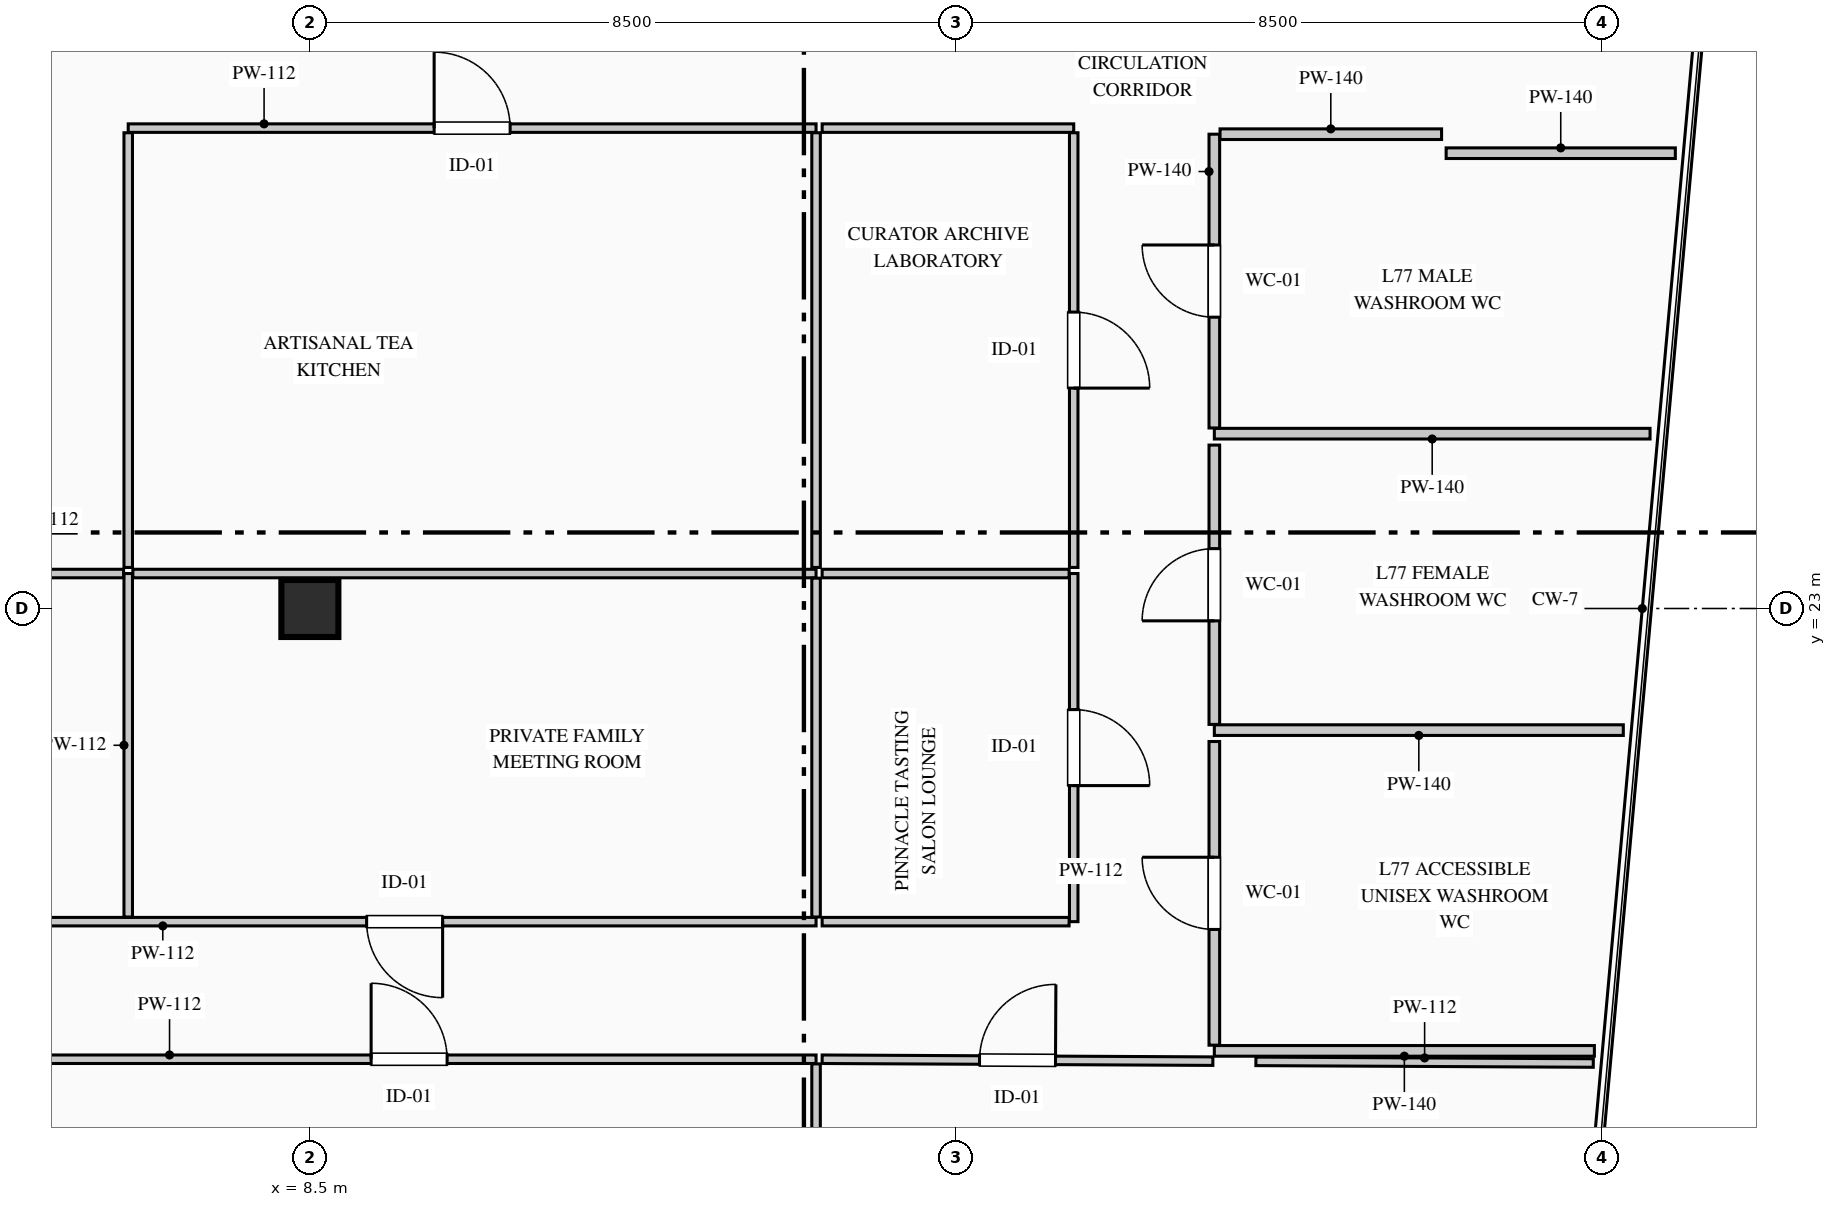
"""IFC4 building model, lengths in metres.
Left out: names, types, materials, properties, quantities, classifications, styles, units other than length and angle.
Written with IfcOpenShell. Run it as: python <this file> out.ifc"""

import sys

from ifc_helpers import new_model, si_unit, direction, frame, frame_2d, origin, origin_2d, place, context, subcontext, project, spatial, rectangle, extrude, element, fill, save


model = new_model("IFC4")
c1 = context("Model", 3, precision=1e-05, world=origin(), true_north=direction((0.0, 1.0)))
c2 = subcontext(c1, "Body", "Model", "MODEL_VIEW")
j1 = project(units=[si_unit("LENGTHUNIT", "METRE"), si_unit("PLANEANGLEUNIT", "RADIAN")], contexts=[c1])
p1 = place(None, origin())
s1 = spatial("IfcSite", under=j1, at=p1, CompositionType="ELEMENT")
p2 = place(p1, origin())
s2 = spatial("IfcBuilding", under=s1, at=p2, CompositionType="ELEMENT")
p3 = place(p2, frame((0.0, 0.0, 319.9)))
s3 = spatial("IfcBuildingStorey", under=s2, at=p3, CompositionType="ELEMENT", Elevation=319.9)
p4 = place(p3, frame((8.5, 23.0, 0.0), z_axis=(0.0, 0.0, 1.0), x_axis=(1.0, 0.0, 0.0)))
e1 = element("IfcColumn", 1, at=p4, inside=s3, PredefinedType="COLUMN", context=c2, shape_type="SweptSolid", body=[
    extrude(rectangle(XDim=0.75, YDim=0.75, at=origin_2d()), origin(), (0.0, 0.0, 1.0), 4.15),
])
p5 = place(p3, frame((23.45, 28.99, 0.0), z_axis=(0.0, 0.0, 1.0), x_axis=(1.0, 0.0, 0.0)))
e2 = element("IfcWall", 2, at=p5, inside=s3, PredefinedType="PARTITIONING", context=c2, shape_type="SweptSolid", body=[
    extrude(rectangle(XDim=3.016, YDim=0.14, at=frame_2d((1.508, 0.0))), origin(), (0.0, 0.0, 1.0), 3.83),
])
p6 = place(p3, frame((26.133, 25.3, 0.0), z_axis=(0.0, 0.0, 1.0), x_axis=(-1.0, 0.0, 0.0)))
e3 = element("IfcWall", 3, at=p6, inside=s3, PredefinedType="PARTITIONING", context=c2, shape_type="SweptSolid", body=[
    extrude(rectangle(XDim=5.733, YDim=0.14, at=frame_2d((2.866, 0.0))), origin(), (0.0, 0.0, 1.0), 3.83),
])
p7 = place(p3, frame((20.4, 25.375, 0.0), z_axis=(0.0, 0.0, 1.0), x_axis=(0.0, 1.0, 0.0)))
e4 = element("IfcWall", 4, at=p7, inside=s3, PredefinedType="PARTITIONING", context=c2, shape_type="SweptSolid", body=[
    extrude(rectangle(XDim=3.865, YDim=0.14, at=frame_2d((1.933, 0.0))), origin(), (0.0, 0.0, 1.0), 3.83),
])
p8 = place(p7, frame((1.458, 0.0, 0.0)))
e5 = element("IfcOpeningElement", 5, at=p8, cuts=e4, PredefinedType="OPENING", context=c2, shape_type="SweptSolid", body=[
    extrude(rectangle(XDim=0.95, YDim=2.15, at=frame_2d((0.475, 1.075))), frame((0.0, 0.08, 0.0), z_axis=(0.0, -1.0, 0.0), x_axis=(1.0, 0.0, 0.0)), (0.0, 0.0, 1.0), 0.16),
])
p9 = place(p3, frame((20.475, 29.24, 0.0), z_axis=(0.0, 0.0, 1.0), x_axis=(1.0, 0.0, 0.0)))
e6 = element("IfcWall", 6, at=p9, inside=s3, PredefinedType="PARTITIONING", context=c2, shape_type="SweptSolid", body=[
    extrude(rectangle(XDim=2.915, YDim=0.14, at=frame_2d((1.458, 0.0))), origin(), (0.0, 0.0, 1.0), 3.83),
])
p10 = place(p3, frame((25.781, 21.4, 0.0), z_axis=(0.0, 0.0, 1.0), x_axis=(-1.0, 0.0, 0.0)))
e7 = element("IfcWall", 7, at=p10, inside=s3, PredefinedType="PARTITIONING", context=c2, shape_type="SweptSolid", body=[
    extrude(rectangle(XDim=5.381, YDim=0.14, at=frame_2d((2.69, 0.0))), origin(), (0.0, 0.0, 1.0), 3.83),
])
p11 = place(p3, frame((20.4, 21.475, 0.0), z_axis=(0.0, 0.0, 1.0), x_axis=(0.0, 1.0, 0.0)))
e8 = element("IfcWall", 8, at=p11, inside=s3, PredefinedType="PARTITIONING", context=c2, shape_type="SweptSolid", body=[
    extrude(rectangle(XDim=3.675, YDim=0.14, at=frame_2d((1.837, 0.0))), origin(), (0.0, 0.0, 1.0), 3.83),
])
p12 = place(p11, frame((1.363, 0.0, 0.0)))
e9 = element("IfcOpeningElement", 9, at=p12, cuts=e8, PredefinedType="OPENING", context=c2, shape_type="SweptSolid", body=[
    extrude(rectangle(XDim=0.95, YDim=2.15, at=frame_2d((0.475, 1.075))), frame((0.0, 0.08, 0.0), z_axis=(0.0, -1.0, 0.0), x_axis=(1.0, 0.0, 0.0)), (0.0, 0.0, 1.0), 0.16),
])
p13 = place(p3, frame((25.4, 17.18, 0.0), z_axis=(0.0, 0.0, 1.0), x_axis=(-1.0, 0.0, 0.0)))
e10 = element("IfcWall", 10, at=p13, inside=s3, PredefinedType="PARTITIONING", context=c2, shape_type="SweptSolid", body=[
    extrude(rectangle(XDim=5.0, YDim=0.14, at=frame_2d((2.5, 0.0))), origin(), (0.0, 0.0, 1.0), 3.83),
])
p14 = place(p3, frame((20.4, 17.255, 0.0), z_axis=(0.0, 0.0, 1.0), x_axis=(0.0, 1.0, 0.0)))
e11 = element("IfcWall", 11, at=p14, inside=s3, PredefinedType="PARTITIONING", context=c2, shape_type="SweptSolid", body=[
    extrude(rectangle(XDim=3.995, YDim=0.14, at=frame_2d((1.998, 0.0))), origin(), (0.0, 0.0, 1.0), 3.83),
])
p15 = place(p14, frame((1.522, 0.0, 0.0)))
e12 = element("IfcOpeningElement", 12, at=p15, cuts=e11, PredefinedType="OPENING", context=c2, shape_type="SweptSolid", body=[
    extrude(rectangle(XDim=0.95, YDim=2.15, at=frame_2d((0.475, 1.075))), frame((0.0, 0.08, 0.0), z_axis=(0.0, -1.0, 0.0), x_axis=(1.0, 0.0, 0.0)), (0.0, 0.0, 1.0), 0.16),
])
p16 = place(p3, frame((4.451, 17.07, 0.0), z_axis=(0.0, 0.0, 1.0), x_axis=(1.0, 0.0, 0.0)))
e13 = element("IfcWall", 13, at=p16, inside=s3, PredefinedType="PARTITIONING", context=c2, shape_type="SweptSolid", body=[
    extrude(rectangle(XDim=10.708, YDim=0.112, at=frame_2d((5.354, 0.0))), origin(), (0.0, 0.0, 1.0), 3.83),
])
p17 = place(p16, frame((4.854, 0.0, 0.0)))
e14 = element("IfcOpeningElement", 14, at=p17, cuts=e13, PredefinedType="OPENING", context=c2, shape_type="SweptSolid", body=[
    extrude(rectangle(XDim=1.0, YDim=2.15, at=frame_2d((0.5, 1.075))), frame((0.0, 0.066, 0.0), z_axis=(0.0, -1.0, 0.0), x_axis=(1.0, 0.0, 0.0)), (0.0, 0.0, 1.0), 0.132),
])
p18 = place(p3, frame((15.16, 17.009, 0.0), z_axis=(0.0, 0.0, 1.0), x_axis=(0.0, -1.0, 0.0)))
e15 = element("IfcWall", 15, at=p18, inside=s3, PredefinedType="PARTITIONING", context=c2, shape_type="SweptSolid", body=[
    extrude(rectangle(XDim=6.884, YDim=0.112, at=frame_2d((3.442, 0.0))), origin(), (0.0, 0.0, 1.0), 3.83),
])
p19 = place(p3, frame((20.947, 17.042, 0.0), z_axis=(0.0, 0.0, 1.0), x_axis=(0.999988019942, -0.004894892409, 0.0)))
e16 = element("IfcWall", 16, at=p19, inside=s3, PredefinedType="PARTITIONING", context=c2, shape_type="SweptSolid", body=[
    extrude(rectangle(XDim=4.439, YDim=0.112, at=frame_2d((2.219, 0.0))), origin(), (0.0, 0.0, 1.0), 3.83),
])
p20 = place(p3, frame((15.24, 17.07, 0.0), z_axis=(0.0, 0.0, 1.0), x_axis=(0.999988036902, -0.0048914265, 0.0)))
e17 = element("IfcWall", 17, at=p20, inside=s3, PredefinedType="PARTITIONING", context=c2, shape_type="SweptSolid", body=[
    extrude(rectangle(XDim=5.141, YDim=0.112, at=frame_2d((2.57, 0.0))), origin(), (0.0, 0.0, 1.0), 3.83),
])
p21 = place(p20, frame((2.071, 0.0, 0.0)))
e18 = element("IfcOpeningElement", 18, at=p21, cuts=e17, PredefinedType="OPENING", context=c2, shape_type="SweptSolid", body=[
    extrude(rectangle(XDim=1.0, YDim=2.15, at=frame_2d((0.5, 1.075))), frame((0.0, 0.066, 0.0), z_axis=(0.0, -1.0, 0.0), x_axis=(1.0, 0.0, 0.0)), (0.0, 0.0, 1.0), 0.132),
])
p22 = place(p3, frame((15.16, 18.88, 0.0), z_axis=(0.0, 0.0, 1.0), x_axis=(-1.0, 0.0, 0.0)))
e19 = element("IfcWall", 19, at=p22, inside=s3, PredefinedType="PARTITIONING", context=c2, shape_type="SweptSolid", body=[
    extrude(rectangle(XDim=10.827, YDim=0.112, at=frame_2d((5.413, 0.0))), origin(), (0.0, 0.0, 1.0), 3.83),
])
p23 = place(p22, frame((4.913, 0.0, 0.0)))
e20 = element("IfcOpeningElement", 20, at=p23, cuts=e19, PredefinedType="OPENING", context=c2, shape_type="SweptSolid", body=[
    extrude(rectangle(XDim=1.0, YDim=2.15, at=frame_2d((0.5, 1.075))), frame((0.0, 0.066, 0.0), z_axis=(0.0, -1.0, 0.0), x_axis=(1.0, 0.0, 0.0)), (0.0, 0.0, 1.0), 0.132),
])
p24 = place(p3, frame((6.11, 18.941, 0.0), z_axis=(0.0, 0.0, 1.0), x_axis=(0.0, 1.0, 0.0)))
e21 = element("IfcWall", 21, at=p24, inside=s3, PredefinedType="PARTITIONING", context=c2, shape_type="SweptSolid", body=[
    extrude(rectangle(XDim=4.519, YDim=0.112, at=frame_2d((2.26, 0.0))), origin(), (0.0, 0.0, 1.0), 3.83),
])
p25 = place(p3, frame((4.034, 23.46, 0.0), z_axis=(0.0, 0.0, 1.0), x_axis=(1.0, 0.0, 0.0)))
e22 = element("IfcWall", 22, at=p25, inside=s3, PredefinedType="PARTITIONING", context=c2, shape_type="SweptSolid", body=[
    extrude(rectangle(XDim=2.015, YDim=0.112, at=frame_2d((1.007, 0.0))), origin(), (0.0, 0.0, 1.0), 3.83),
])
p26 = place(p3, frame((6.171, 23.46, 0.0), z_axis=(0.0, 0.0, 1.0), x_axis=(1.0, 0.0, 0.0)))
e23 = element("IfcWall", 23, at=p26, inside=s3, PredefinedType="PARTITIONING", context=c2, shape_type="SweptSolid", body=[
    extrude(rectangle(XDim=8.989, YDim=0.112, at=frame_2d((4.495, 0.0))), origin(), (0.0, 0.0, 1.0), 3.83),
])
p27 = place(p3, frame((15.16, 23.399, 0.0), z_axis=(0.0, 0.0, 1.0), x_axis=(0.0, -1.0, 0.0)))
e24 = element("IfcWall", 24, at=p27, inside=s3, PredefinedType="PARTITIONING", context=c2, shape_type="SweptSolid", body=[
    extrude(rectangle(XDim=4.458, YDim=0.112, at=frame_2d((2.229, 0.0))), origin(), (0.0, 0.0, 1.0), 3.83),
])
p28 = place(p3, frame((18.55, 23.46, 0.0), z_axis=(0.0, 0.0, 1.0), x_axis=(0.0, -1.0, 0.0)))
e25 = element("IfcWall", 25, at=p28, inside=s3, PredefinedType="PARTITIONING", context=c2, shape_type="SweptSolid", body=[
    extrude(rectangle(XDim=4.58, YDim=0.112, at=frame_2d((2.29, 0.0))), origin(), (0.0, 0.0, 1.0), 3.83),
])
p29 = place(p28, frame((1.79, 0.0, 0.0)))
e26 = element("IfcOpeningElement", 26, at=p29, cuts=e25, PredefinedType="OPENING", context=c2, shape_type="SweptSolid", body=[
    extrude(rectangle(XDim=1.0, YDim=2.15, at=frame_2d((0.5, 1.075))), frame((0.0, 0.066, 0.0), z_axis=(0.0, -1.0, 0.0), x_axis=(1.0, 0.0, 0.0)), (0.0, 0.0, 1.0), 0.132),
])
for number, where, z_axis, x_axis in (
    (27, (18.489, 18.88, 0.0), (0.0, 0.0, 1.0), (-1.0, 0.0, 0.0)),
    (28, (15.24, 23.46, 0.0), (0.0, 0.0, 1.0), (1.0, 0.0, 0.0)),
):
    element("IfcWall", number, at=place(p3, frame(where, z_axis=z_axis, x_axis=x_axis)), inside=s3, PredefinedType="PARTITIONING", context=c2, shape_type="SweptSolid", body=[
        extrude(rectangle(XDim=3.249, YDim=0.112, at=frame_2d((1.625, 0.0))), origin(), (0.0, 0.0, 1.0), 3.83),
    ])
p30 = place(p3, frame((6.11, 29.32, 0.0), z_axis=(0.0, 0.0, 1.0), x_axis=(1.0, 0.0, 0.0)))
e29 = element("IfcWall", 29, at=p30, inside=s3, PredefinedType="PARTITIONING", context=c2, shape_type="SweptSolid", body=[
    extrude(rectangle(XDim=9.05, YDim=0.112, at=frame_2d((4.525, 0.0))), origin(), (0.0, 0.0, 1.0), 3.83),
])
p31 = place(p30, frame((4.025, 0.0, 0.0)))
e30 = element("IfcOpeningElement", 30, at=p31, cuts=e29, PredefinedType="OPENING", context=c2, shape_type="SweptSolid", body=[
    extrude(rectangle(XDim=1.0, YDim=2.15, at=frame_2d((0.5, 1.075))), frame((0.0, 0.066, 0.0), z_axis=(0.0, -1.0, 0.0), x_axis=(1.0, 0.0, 0.0)), (0.0, 0.0, 1.0), 0.132),
])
for number, where, z_axis, x_axis in (
    (31, (15.16, 29.259, 0.0), (0.0, 0.0, 1.0), (0.0, -1.0, 0.0)),
    (32, (6.11, 23.54, 0.0), (0.0, 0.0, 1.0), (0.0, 1.0, 0.0)),
):
    element("IfcWall", number, at=place(p3, frame(where, z_axis=z_axis, x_axis=x_axis)), inside=s3, PredefinedType="PARTITIONING", context=c2, shape_type="SweptSolid", body=[
        extrude(rectangle(XDim=5.719, YDim=0.112, at=frame_2d((2.859, 0.0))), origin(), (0.0, 0.0, 1.0), 3.83),
    ])
p32 = place(p3, frame((15.24, 29.32, 0.0), z_axis=(0.0, 0.0, 1.0), x_axis=(1.0, 0.0, 0.0)))
e33 = element("IfcWall", 33, at=p32, inside=s3, PredefinedType="PARTITIONING", context=c2, shape_type="SweptSolid", body=[
    extrude(rectangle(XDim=3.31, YDim=0.112, at=frame_2d((1.655, 0.0))), origin(), (0.0, 0.0, 1.0), 3.83),
])
p33 = place(p3, frame((18.55, 29.259, 0.0), z_axis=(0.0, 0.0, 1.0), x_axis=(0.0, -1.0, 0.0)))
e34 = element("IfcWall", 34, at=p33, inside=s3, PredefinedType="PARTITIONING", context=c2, shape_type="SweptSolid", body=[
    extrude(rectangle(XDim=5.719, YDim=0.112, at=frame_2d((2.859, 0.0))), origin(), (0.0, 0.0, 1.0), 3.83),
])
p34 = place(p33, frame((2.36, 0.0, 0.0)))
e35 = element("IfcOpeningElement", 35, at=p34, cuts=e34, PredefinedType="OPENING", context=c2, shape_type="SweptSolid", body=[
    extrude(rectangle(XDim=1.0, YDim=2.15, at=frame_2d((0.5, 1.075))), frame((0.0, 0.066, 0.0), z_axis=(0.0, -1.0, 0.0), x_axis=(1.0, 0.0, 0.0)), (0.0, 0.0, 1.0), 0.132),
])
p35 = place(p8, origin())
e36 = element("IfcDoor", 36, at=p35, inside=s3, OperationType="SINGLE_SWING_RIGHT", PredefinedType="DOOR", context=c2, shape_type="SweptSolid", body=[
    extrude(rectangle(XDim=0.95, YDim=2.15, at=frame_2d((0.475, 1.075))), frame((0.0, 0.025, 0.0), z_axis=(0.0, -1.0, 0.0), x_axis=(1.0, 0.0, 0.0)), (0.0, 0.0, 1.0), 0.05),
])
fill(e5, e36)
p36 = place(p12, origin())
e37 = element("IfcDoor", 37, at=p36, inside=s3, OperationType="SINGLE_SWING_LEFT", PredefinedType="DOOR", context=c2, shape_type="SweptSolid", body=[
    extrude(rectangle(XDim=0.95, YDim=2.15, at=frame_2d((0.475, 1.075))), frame((0.0, 0.025, 0.0), z_axis=(0.0, -1.0, 0.0), x_axis=(1.0, 0.0, 0.0)), (0.0, 0.0, 1.0), 0.05),
])
fill(e9, e37)
p37 = place(p15, origin())
e38 = element("IfcDoor", 38, at=p37, inside=s3, OperationType="SINGLE_SWING_RIGHT", PredefinedType="DOOR", context=c2, shape_type="SweptSolid", body=[
    extrude(rectangle(XDim=0.95, YDim=2.15, at=frame_2d((0.475, 1.075))), frame((0.0, 0.025, 0.0), z_axis=(0.0, -1.0, 0.0), x_axis=(1.0, 0.0, 0.0)), (0.0, 0.0, 1.0), 0.05),
])
fill(e12, e38)
p38 = place(p17, origin())
e39 = element("IfcDoor", 39, at=p38, inside=s3, OperationType="SINGLE_SWING_LEFT", PredefinedType="DOOR", context=c2, shape_type="SweptSolid", body=[
    extrude(rectangle(XDim=1.0, YDim=2.15, at=frame_2d((0.5, 1.075))), frame((0.0, 0.025, 0.0), z_axis=(0.0, -1.0, 0.0), x_axis=(1.0, 0.0, 0.0)), (0.0, 0.0, 1.0), 0.05),
])
fill(e14, e39)
p39 = place(p21, origin())
e40 = element("IfcDoor", 40, at=p39, inside=s3, OperationType="SINGLE_SWING_RIGHT", PredefinedType="DOOR", context=c2, shape_type="SweptSolid", body=[
    extrude(rectangle(XDim=1.0, YDim=2.15, at=frame_2d((0.5, 1.075))), frame((0.0, 0.025, 0.0), z_axis=(0.0, -1.0, 0.0), x_axis=(1.0, 0.0, 0.0)), (0.0, 0.0, 1.0), 0.05),
])
fill(e18, e40)
p40 = place(p23, origin())
e41 = element("IfcDoor", 41, at=p40, inside=s3, OperationType="SINGLE_SWING_LEFT", PredefinedType="DOOR", context=c2, shape_type="SweptSolid", body=[
    extrude(rectangle(XDim=1.0, YDim=2.15, at=frame_2d((0.5, 1.075))), frame((0.0, 0.025, 0.0), z_axis=(0.0, -1.0, 0.0), x_axis=(1.0, 0.0, 0.0)), (0.0, 0.0, 1.0), 0.05),
])
fill(e20, e41)
p41 = place(p29, origin())
e42 = element("IfcDoor", 42, at=p41, inside=s3, OperationType="SINGLE_SWING_RIGHT", PredefinedType="DOOR", context=c2, shape_type="SweptSolid", body=[
    extrude(rectangle(XDim=1.0, YDim=2.15, at=frame_2d((0.5, 1.075))), frame((0.0, 0.025, 0.0), z_axis=(0.0, -1.0, 0.0), x_axis=(1.0, 0.0, 0.0)), (0.0, 0.0, 1.0), 0.05),
])
fill(e26, e42)
p42 = place(p31, origin())
e43 = element("IfcDoor", 43, at=p42, inside=s3, OperationType="SINGLE_SWING_LEFT", PredefinedType="DOOR", context=c2, shape_type="SweptSolid", body=[
    extrude(rectangle(XDim=1.0, YDim=2.15, at=frame_2d((0.5, 1.075))), frame((0.0, 0.025, 0.0), z_axis=(0.0, -1.0, 0.0), x_axis=(1.0, 0.0, 0.0)), (0.0, 0.0, 1.0), 0.05),
])
fill(e30, e43)
p43 = place(p34, origin())
e44 = element("IfcDoor", 44, at=p43, inside=s3, OperationType="SINGLE_SWING_RIGHT", PredefinedType="DOOR", context=c2, shape_type="SweptSolid", body=[
    extrude(rectangle(XDim=1.0, YDim=2.15, at=frame_2d((0.5, 1.075))), frame((0.0, 0.025, 0.0), z_axis=(0.0, -1.0, 0.0), x_axis=(1.0, 0.0, 0.0)), (0.0, 0.0, 1.0), 0.05),
])
fill(e35, e44)
save(model, sys.argv[1])
